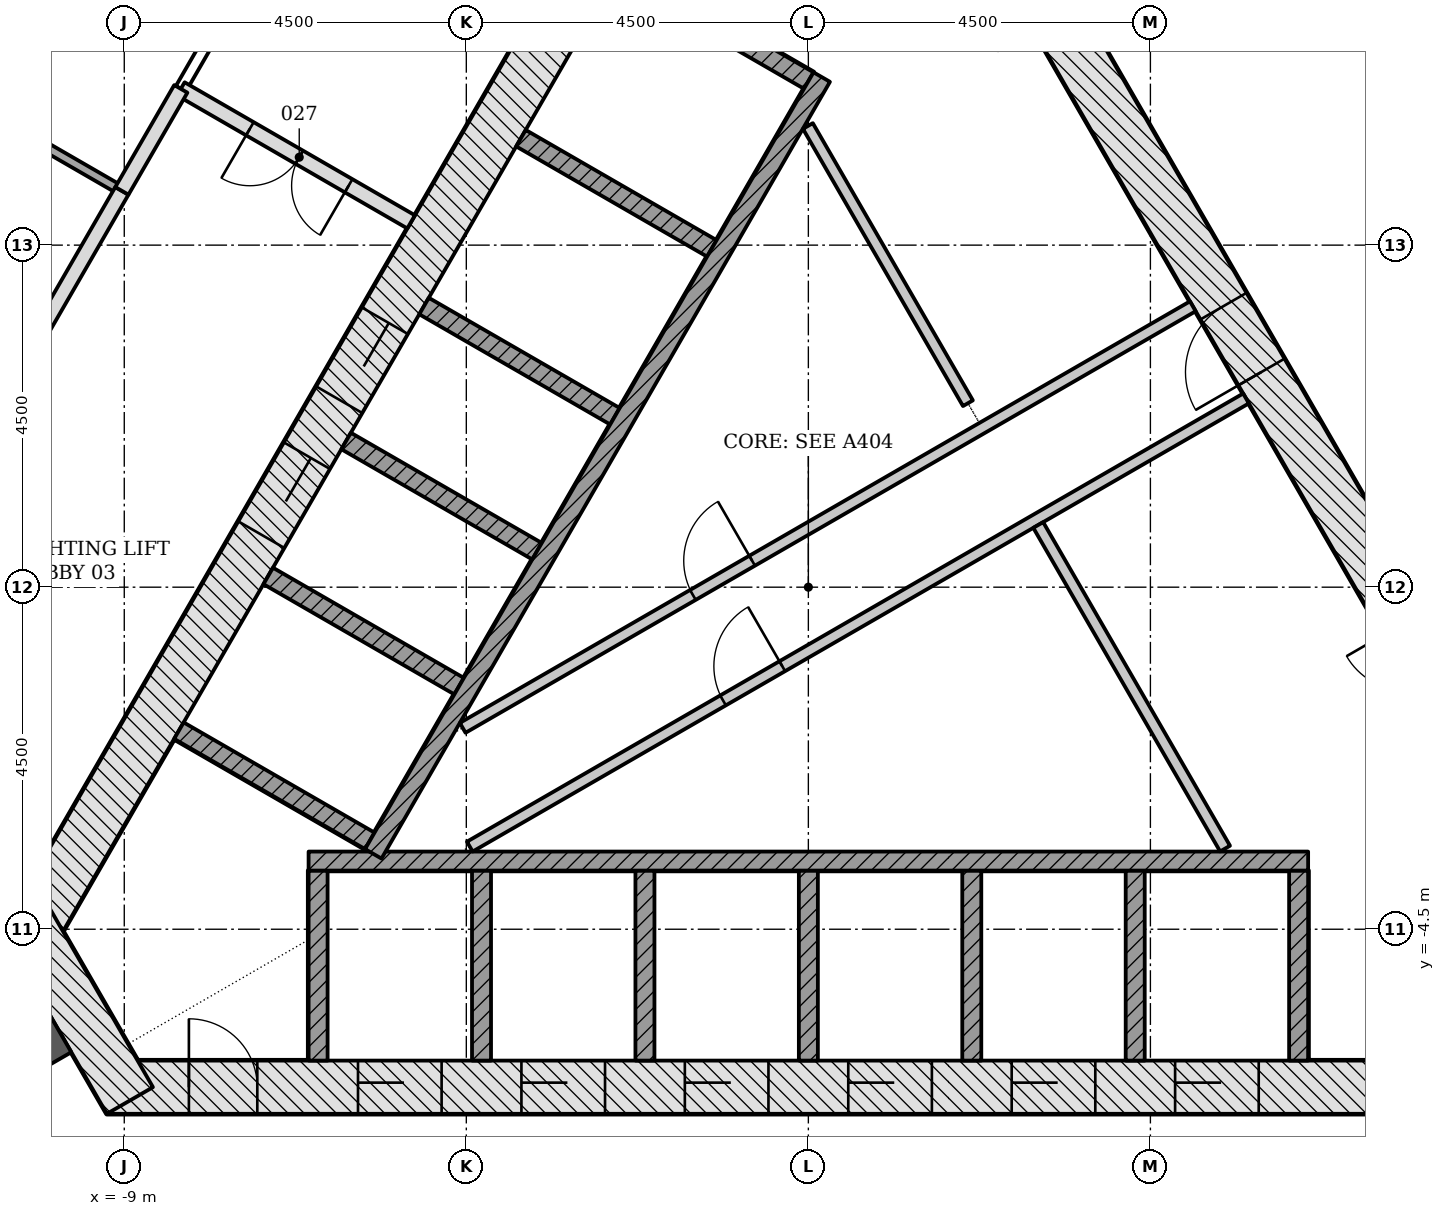
"""IFC4 building model, lengths in metres.
Left out: names, types, materials, properties, quantities, classifications, styles, units other than length and angle.
Written with IfcOpenShell. Run it as: python <this file> out.ifc"""

import sys

from ifc_helpers import new_model, si_unit, direction, frame, frame_2d, origin, place, context, subcontext, project, spatial, rectangle, extrude, element, fill, save


model = new_model("IFC4")
c1 = context("Model", 3, precision=1e-05, world=origin(), true_north=direction((0.0, 1.0)))
c2 = subcontext(c1, "Body", "Model", "MODEL_VIEW")
j1 = project(units=[si_unit("LENGTHUNIT", "METRE"), si_unit("PLANEANGLEUNIT", "RADIAN")], contexts=[c1])
p1 = place(None, origin())
s1 = spatial("IfcSite", under=j1, at=p1, CompositionType="ELEMENT")
p2 = place(p1, origin())
s2 = spatial("IfcBuilding", under=s1, at=p2, CompositionType="ELEMENT")
p3 = place(p2, frame((0.0, 0.0, 15.0)))
s3 = spatial("IfcBuildingStorey", under=s2, at=p3, CompositionType="ELEMENT", Elevation=15.0)
p4 = place(p3, frame((-9.229, -6.578, -0.25), z_axis=(0.0, 0.0, 1.0), x_axis=(1.0, 0.0, 0.0)))
e1 = element("IfcWall", 1, at=p4, inside=s3, PredefinedType="SHEAR", context=c2, shape_type="SweptSolid", body=[
    extrude(rectangle(XDim=18.458, YDim=0.7, at=frame_2d((9.229, 0.0))), origin(), (0.0, 0.0, 1.0), 4.5),
])
p5 = place(p4, frame((3.304, 0.0, 0.25)))
e2 = element("IfcOpeningElement", 2, at=p5, cuts=e1, PredefinedType="OPENING", context=c2, shape_type="SweptSolid", body=[
    extrude(rectangle(XDim=1.1, YDim=2.1, at=frame_2d((0.55, 1.05))), frame((0.0, 0.36, 0.0), z_axis=(0.0, -1.0, 0.0), x_axis=(1.0, 0.0, 0.0)), (0.0, 0.0, 1.0), 0.72),
])
p6 = place(p4, frame((5.454, 0.0, 0.25)))
e3 = element("IfcOpeningElement", 3, at=p6, cuts=e1, PredefinedType="OPENING", context=c2, shape_type="SweptSolid", body=[
    extrude(rectangle(XDim=1.1, YDim=2.1, at=frame_2d((0.55, 1.05))), frame((0.0, 0.36, 0.0), z_axis=(0.0, -1.0, 0.0), x_axis=(1.0, 0.0, 0.0)), (0.0, 0.0, 1.0), 0.72),
])
p7 = place(p4, frame((7.604, 0.0, 0.25)))
e4 = element("IfcOpeningElement", 4, at=p7, cuts=e1, PredefinedType="OPENING", context=c2, shape_type="SweptSolid", body=[
    extrude(rectangle(XDim=1.1, YDim=2.1, at=frame_2d((0.55, 1.05))), frame((0.0, 0.36, 0.0), z_axis=(0.0, -1.0, 0.0), x_axis=(1.0, 0.0, 0.0)), (0.0, 0.0, 1.0), 0.72),
])
p8 = place(p4, frame((9.754, 0.0, 0.25)))
e5 = element("IfcOpeningElement", 5, at=p8, cuts=e1, PredefinedType="OPENING", context=c2, shape_type="SweptSolid", body=[
    extrude(rectangle(XDim=1.1, YDim=2.1, at=frame_2d((0.55, 1.05))), frame((0.0, 0.36, 0.0), z_axis=(0.0, -1.0, 0.0), x_axis=(1.0, 0.0, 0.0)), (0.0, 0.0, 1.0), 0.72),
])
p9 = place(p4, frame((11.904, 0.0, 0.25)))
e6 = element("IfcOpeningElement", 6, at=p9, cuts=e1, PredefinedType="OPENING", context=c2, shape_type="SweptSolid", body=[
    extrude(rectangle(XDim=1.1, YDim=2.1, at=frame_2d((0.55, 1.05))), frame((0.0, 0.36, 0.0), z_axis=(0.0, -1.0, 0.0), x_axis=(1.0, 0.0, 0.0)), (0.0, 0.0, 1.0), 0.72),
])
p10 = place(p4, frame((14.054, 0.0, 0.25)))
e7 = element("IfcOpeningElement", 7, at=p10, cuts=e1, PredefinedType="OPENING", context=c2, shape_type="SweptSolid", body=[
    extrude(rectangle(XDim=1.1, YDim=2.1, at=frame_2d((0.55, 1.05))), frame((0.0, 0.36, 0.0), z_axis=(0.0, -1.0, 0.0), x_axis=(1.0, 0.0, 0.0)), (0.0, 0.0, 1.0), 0.72),
])
p11 = place(p4, frame((1.079, 0.0, 0.25)))
e8 = element("IfcOpeningElement", 8, at=p11, cuts=e1, PredefinedType="OPENING", context=c2, shape_type="SweptSolid", body=[
    extrude(rectangle(XDim=0.9, YDim=2.1, at=frame_2d((0.45, 1.05))), frame((0.0, 0.36, 0.0), z_axis=(0.0, -1.0, 0.0), x_axis=(1.0, 0.0, 0.0)), (0.0, 0.0, 1.0), 0.72),
])
p12 = place(p3, frame((10.311, -4.703, -0.25), z_axis=(0.0, 0.0, 1.0), x_axis=(-0.500001446645, 0.866024568562, 0.0)))
e9 = element("IfcWall", 9, at=p12, inside=s3, PredefinedType="SHEAR", context=c2, shape_type="SweptSolid", body=[
    extrude(rectangle(XDim=18.458, YDim=0.7, at=frame_2d((9.229, 0.0))), origin(), (0.0, 0.0, 1.0), 4.5),
])
p13 = place(p12, frame((8.7, 0.0, 0.25)))
e10 = element("IfcOpeningElement", 10, at=p13, cuts=e9, PredefinedType="OPENING", context=c2, shape_type="SweptSolid", body=[
    extrude(rectangle(XDim=1.0, YDim=2.1, at=frame_2d((0.5, 1.05))), frame((0.0, 0.36, 0.0), z_axis=(0.0, -1.0, 0.0), x_axis=(1.0, 0.0, 0.0)), (0.0, 0.0, 1.0), 0.72),
])
p14 = place(p12, frame((4.002, 0.0, 0.25)))
e11 = element("IfcOpeningElement", 11, at=p14, cuts=e9, PredefinedType="OPENING", context=c2, shape_type="SweptSolid", body=[
    extrude(rectangle(XDim=0.9, YDim=2.1, at=frame_2d((0.45, 1.05))), frame((0.0, 0.36, 0.0), z_axis=(0.0, -1.0, 0.0), x_axis=(1.0, 0.0, 0.0)), (0.0, 0.0, 1.0), 0.72),
])
p15 = place(p12, frame((14.093, 0.0, 0.25)))
e12 = element("IfcOpeningElement", 12, at=p15, cuts=e9, PredefinedType="OPENING", context=c2, shape_type="SweptSolid", body=[
    extrude(rectangle(XDim=0.9, YDim=2.1, at=frame_2d((0.45, 1.05))), frame((0.0, 0.36, 0.0), z_axis=(0.0, -1.0, 0.0), x_axis=(1.0, 0.0, 0.0)), (0.0, 0.0, 1.0), 0.72),
])
p16 = place(p3, frame((-1.083, 11.281, -0.25), z_axis=(0.0, 0.0, 1.0), x_axis=(-0.500001446645, -0.866024568562, 0.0)))
e13 = element("IfcWall", 13, at=p16, inside=s3, PredefinedType="SHEAR", context=c2, shape_type="SweptSolid", body=[
    extrude(rectangle(XDim=18.458, YDim=0.7, at=frame_2d((9.229, 0.0))), origin(), (0.0, 0.0, 1.0), 4.5),
])
p17 = place(p16, frame((8.979, 0.0, 0.25)))
e14 = element("IfcOpeningElement", 14, at=p17, cuts=e13, PredefinedType="OPENING", context=c2, shape_type="SweptSolid", body=[
    extrude(rectangle(XDim=1.2, YDim=2.1, at=frame_2d((0.6, 1.05))), frame((0.0, 0.36, 0.0), z_axis=(0.0, -1.0, 0.0), x_axis=(1.0, 0.0, 0.0)), (0.0, 0.0, 1.0), 0.72),
])
p18 = place(p16, frame((11.029, 0.0, 0.25)))
e15 = element("IfcOpeningElement", 15, at=p18, cuts=e13, PredefinedType="OPENING", context=c2, shape_type="SweptSolid", body=[
    extrude(rectangle(XDim=1.2, YDim=2.1, at=frame_2d((0.6, 1.05))), frame((0.0, 0.36, 0.0), z_axis=(0.0, -1.0, 0.0), x_axis=(1.0, 0.0, 0.0)), (0.0, 0.0, 1.0), 0.72),
])
p19 = place(p3, frame((-10.311, -4.353, -0.25), z_axis=(0.0, 0.0, 1.0), x_axis=(0.500042739161, -0.866000726912, 0.0)))
e16 = element("IfcWall", 16, at=p19, inside=s3, PredefinedType="SHEAR", context=c2, shape_type="SweptSolid", body=[
    extrude(rectangle(XDim=2.771, YDim=0.7, at=frame_2d((1.386, 0.0))), origin(), (0.0, 0.0, 1.0), 4.5),
])
p20 = place(p3, frame((-9.922, -5.728, -0.25), z_axis=(0.0, 0.0, 1.0), x_axis=(-0.866028046028, -0.499995423472, 0.0)))
e17 = element("IfcWall", 17, at=p20, inside=s3, PredefinedType="SHEAR", context=c2, shape_type="SweptSolid", body=[
    extrude(rectangle(XDim=14.633, YDim=0.9, at=frame_2d((7.316, 0.0))), origin(), (0.0, 0.0, 1.0), 4.5),
])
p21 = place(p20, frame((7.35, 0.0, 0.25)))
e18 = element("IfcOpeningElement", 18, at=p21, cuts=e17, PredefinedType="OPENING", context=c2, shape_type="SweptSolid", body=[
    extrude(rectangle(XDim=1.5, YDim=2.1, at=frame_2d((0.75, 1.05))), frame((0.0, 0.46, 0.0), z_axis=(0.0, -1.0, 0.0), x_axis=(1.0, 0.0, 0.0)), (0.0, 0.0, 1.0), 0.92),
])
for number, where, z_axis, x_axis in (
    (19, (-6.45, -6.228, -0.25), (0.0, 0.0, 1.0), (0.0, 1.0, 0.0)),
    (20, (-4.3, -6.228, -0.25), (0.0, 0.0, 1.0), (0.0, 1.0, 0.0)),
    (21, (-2.15, -6.228, -0.25), (0.0, 0.0, 1.0), (0.0, 1.0, 0.0)),
    (22, (0.0, -6.228, -0.25), (0.0, 0.0, 1.0), (0.0, 1.0, 0.0)),
    (23, (2.15, -6.228, -0.25), (0.0, 0.0, 1.0), (0.0, 1.0, 0.0)),
    (24, (4.3, -6.228, -0.25), (0.0, 0.0, 1.0), (0.0, 1.0, 0.0)),
    (25, (6.45, -6.228, -0.25), (0.0, 0.0, 1.0), (0.0, 1.0, 0.0)),
):
    element("IfcWall", number, at=place(p3, frame(where, z_axis=z_axis, x_axis=x_axis)), inside=s3, PredefinedType="PARTITIONING", context=c2, shape_type="SweptSolid", body=[
        extrude(rectangle(XDim=2.5, YDim=0.25, at=frame_2d((1.25, 0.0))), origin(), (0.0, 0.0, 1.0), 4.5),
    ])
p22 = place(p3, frame((-6.575, -3.603, 0.0), z_axis=(0.0, 0.0, 1.0), x_axis=(1.0, 0.0, 0.0)))
e26 = element("IfcWall", 26, at=p22, inside=s3, PredefinedType="PARTITIONING", context=c2, shape_type="SweptSolid", body=[
    extrude(rectangle(XDim=13.15, YDim=0.25, at=frame_2d((6.575, 0.0))), origin(), (0.0, 0.0, 1.0), 4.25),
])
p23 = place(p3, frame((-2.506, 8.115, -0.25), z_axis=(0.0, 0.0, 1.0), x_axis=(0.865996321171, -0.50005036918, 0.0)))
e27 = element("IfcWall", 27, at=p23, inside=s3, PredefinedType="PARTITIONING", context=c2, shape_type="SweptSolid", body=[
    extrude(rectangle(XDim=2.9, YDim=0.25, at=frame_2d((1.45, 0.0))), origin(), (0.0, 0.0, 1.0), 4.5),
])
for number, where, z_axis, x_axis in (
    (28, (-3.781, 5.907, -0.25), (0.0, 0.0, 1.0), (0.866, -0.5, 0.0)),
    (29, (-5.056, 3.699, -0.25), (0.0, 0.0, 1.0), (0.866, -0.5, 0.0)),
    (30, (-6.081, 1.923, -0.25), (0.0, 0.0, 1.0), (0.866, -0.5, 0.0)),
    (31, (-7.106, 0.148, -0.25), (0.0, 0.0, 1.0), (0.866, -0.5, 0.0)),
    (32, (-8.281, -1.887, -0.25), (0.0, 0.0, 1.0), (0.866, -0.5, 0.0)),
):
    element("IfcWall", number, at=place(p3, frame(where, z_axis=z_axis, x_axis=x_axis)), inside=s3, PredefinedType="PARTITIONING", context=c2, shape_type="SweptSolid", body=[
        extrude(rectangle(XDim=2.9, YDim=0.25, at=frame_2d((1.45, 0.0))), origin(), (0.0, 0.0, 1.0), 4.5),
    ])
p24 = place(p3, frame((0.176, 6.711, 0.0), z_axis=(0.0, 0.0, 1.0), x_axis=(-0.500004227369, -0.866022963098, 0.0)))
e33 = element("IfcWall", 33, at=p24, inside=s3, PredefinedType="PARTITIONING", context=c2, shape_type="SweptSolid", body=[
    extrude(rectangle(XDim=11.8, YDim=0.25, at=frame_2d((5.9, 0.0))), origin(), (0.0, 0.0, 1.0), 4.25),
])
p25 = place(p3, frame((-4.548, -1.851, 0.0), z_axis=(0.0, 0.0, 1.0), x_axis=(0.866023939251, 0.500002536638, 0.0)))
e34 = element("IfcWall", 34, at=p25, inside=s3, PredefinedType="PARTITIONING", context=c2, shape_type="SweptSolid", body=[
    extrude(rectangle(XDim=11.092, YDim=0.15, at=frame_2d((5.546, 0.0))), origin(), (0.0, 0.0, 1.0), 4.25),
])
p26 = place(p25, frame((3.497, 0.0, 0.0)))
e35 = element("IfcOpeningElement", 35, at=p26, cuts=e34, PredefinedType="OPENING", context=c2, shape_type="SweptSolid", body=[
    extrude(rectangle(XDim=0.9, YDim=2.1, at=frame_2d((0.45, 1.05))), frame((0.0, 0.085, 0.0), z_axis=(0.0, -1.0, 0.0), x_axis=(1.0, 0.0, 0.0)), (0.0, 0.0, 1.0), 0.17),
])
p27 = place(p3, frame((2.099, 2.42, 0.0), z_axis=(0.0, 0.0, 1.0), x_axis=(-0.499998449073, 0.866026299211, 0.0)))
e36 = element("IfcWall", 36, at=p27, inside=s3, PredefinedType="PARTITIONING", context=c2, shape_type="SweptSolid", body=[
    extrude(rectangle(XDim=4.211, YDim=0.15, at=frame_2d((2.106, 0.0))), origin(), (0.0, 0.0, 1.0), 4.25),
])
p28 = place(p3, frame((-4.454, -3.413, 0.0), z_axis=(0.0, 0.0, 1.0), x_axis=(0.86603043987, 0.499991277142, 0.0)))
e37 = element("IfcWall", 37, at=p28, inside=s3, PredefinedType="PARTITIONING", context=c2, shape_type="SweptSolid", body=[
    extrude(rectangle(XDim=11.792, YDim=0.15, at=frame_2d((5.896, 0.0))), origin(), (0.0, 0.0, 1.0), 4.25),
])
p29 = place(p28, frame((3.847, 0.0, 0.0)))
e38 = element("IfcOpeningElement", 38, at=p29, cuts=e37, PredefinedType="OPENING", context=c2, shape_type="SweptSolid", body=[
    extrude(rectangle(XDim=0.9, YDim=2.1, at=frame_2d((0.45, 1.05))), frame((0.0, 0.085, 0.0), z_axis=(0.0, -1.0, 0.0), x_axis=(1.0, 0.0, 0.0)), (0.0, 0.0, 1.0), 0.17),
])
p30 = place(p3, frame((5.482, -3.439, 0.0), z_axis=(0.0, 0.0, 1.0), x_axis=(-0.500006183238, 0.866021833861, 0.0)))
e39 = element("IfcWall", 39, at=p30, inside=s3, PredefinedType="PARTITIONING", context=c2, shape_type="SweptSolid", body=[
    extrude(rectangle(XDim=4.916, YDim=0.15, at=frame_2d((2.458, 0.0))), origin(), (0.0, 0.0, 1.0), 4.25),
])
p31 = place(p3, frame((-9.032, 5.213, 0.0), z_axis=(0.0, 0.0, 1.0), x_axis=(-0.499876332206, -0.866096791646, 0.0)))
e40 = element("IfcWall", 40, at=p31, inside=s3, PredefinedType="PARTITIONING", context=c2, shape_type="SweptSolid", body=[
    extrude(rectangle(XDim=4.349, YDim=0.2, at=frame_2d((2.175, 0.0))), origin(), (0.0, 0.0, 1.0), 3.638),
])
p32 = place(p3, frame((-5.226, 4.806, 0.0), z_axis=(0.0, 0.0, 1.0), x_axis=(-0.865949687125, 0.500131122175, 0.0)))
e41 = element("IfcWall", 41, at=p32, inside=s3, PredefinedType="PARTITIONING", context=c2, shape_type="SweptSolid", body=[
    extrude(rectangle(XDim=3.499, YDim=0.2, at=frame_2d((1.75, 0.0))), origin(), (0.0, 0.0, 1.0), 4.25),
])
p33 = place(p32, frame((0.95, 0.0, 0.0)))
e42 = element("IfcOpeningElement", 42, at=p33, cuts=e41, PredefinedType="OPENING", context=c2, shape_type="SweptSolid", body=[
    extrude(rectangle(XDim=1.5, YDim=2.1, at=frame_2d((0.75, 1.05))), frame((0.0, 0.11, 0.0), z_axis=(0.0, -1.0, 0.0), x_axis=(1.0, 0.0, 0.0)), (0.0, 0.0, 1.0), 0.22),
])
p34 = place(p3, frame((-8.256, 6.556, 0.0), z_axis=(0.0, 0.0, 1.0), x_axis=(-0.500104332946, -0.86596515875, 0.0)))
e43 = element("IfcWall", 43, at=p34, inside=s3, PredefinedType="PARTITIONING", context=c2, shape_type="SweptSolid", body=[
    extrude(rectangle(XDim=1.55, YDim=0.2, at=frame_2d((0.775, 0.0))), origin(), (0.0, 0.0, 1.0), 3.638),
])
p35 = place(p3, frame((11.206, 1.446, 0.0), z_axis=(0.0, 0.0, 1.0), x_axis=(-0.500116761363, 0.865957981085, 0.0)))
e44 = element("IfcWall", 44, at=p35, inside=s3, PredefinedType="PARTITIONING", context=c2, shape_type="SweptSolid", body=[
    extrude(rectangle(XDim=8.7, YDim=0.15, at=frame_2d((4.35, 0.0))), origin(), (0.0, 0.0, 1.0), 3.638),
])
p36 = place(p35, frame((3.45, 0.0, 0.0)))
e45 = element("IfcOpeningElement", 45, at=p36, cuts=e44, PredefinedType="OPENING", context=c2, shape_type="SweptSolid", body=[
    extrude(rectangle(XDim=1.8, YDim=2.1, at=frame_2d((0.9, 1.05))), frame((0.0, 0.085, 0.0), z_axis=(0.0, -1.0, 0.0), x_axis=(1.0, 0.0, 0.0)), (0.0, 0.0, 1.0), 0.17),
])
p37 = place(p3, frame((-9.033, 5.214, 0.0), z_axis=(0.0, 0.0, 1.0), x_axis=(-0.866000641544, 0.500042887006, 0.0)))
e46 = element("IfcWall", 46, at=p37, inside=s3, PredefinedType="PARTITIONING", context=c2, shape_type="SweptSolid", body=[
    extrude(rectangle(XDim=9.827, YDim=0.12, at=frame_2d((4.914, 0.0))), origin(), (0.0, 0.0, 1.0), 3.638),
])
p38 = place(p37, frame((4.45, 0.0, 0.0)))
e47 = element("IfcOpeningElement", 47, at=p38, cuts=e46, PredefinedType="OPENING", context=c2, shape_type="SweptSolid", body=[
    extrude(rectangle(XDim=1.0, YDim=2.1, at=frame_2d((0.5, 1.05))), frame((0.0, 0.07, 0.0), z_axis=(0.0, -1.0, 0.0), x_axis=(1.0, 0.0, 0.0)), (0.0, 0.0, 1.0), 0.14),
])
p39 = place(p3, frame((-3.406, 14.956, 0.0), z_axis=(0.0, 0.0, 1.0), x_axis=(-0.500020940175, -0.866013313631, 0.0)))
e48 = element("IfcWall", 48, at=p39, inside=s3, PredefinedType="PARTITIONING", context=c2, shape_type="SweptSolid", body=[
    extrude(rectangle(XDim=9.7, YDim=0.15, at=frame_2d((4.85, 0.0))), origin(), (0.0, 0.0, 1.0), 3.638),
])
p40 = place(p39, frame((3.95, 0.0, 0.0)))
e49 = element("IfcOpeningElement", 49, at=p40, cuts=e48, PredefinedType="OPENING", context=c2, shape_type="SweptSolid", body=[
    extrude(rectangle(XDim=1.8, YDim=2.1, at=frame_2d((0.9, 1.05))), frame((0.0, 0.085, 0.0), z_axis=(0.0, -1.0, 0.0), x_axis=(1.0, 0.0, 0.0)), (0.0, 0.0, 1.0), 0.17),
])
p41 = place(p5, origin())
e50 = element("IfcDoor", 50, at=p41, inside=s3, OperationType="DOUBLE_DOOR_SLIDING", PredefinedType="DOOR", context=c2, shape_type="SweptSolid", body=[
    extrude(rectangle(XDim=1.1, YDim=2.1, at=frame_2d((0.55, 1.05))), frame((0.0, 0.025, 0.0), z_axis=(0.0, -1.0, 0.0), x_axis=(1.0, 0.0, 0.0)), (0.0, 0.0, 1.0), 0.05),
])
fill(e2, e50)
p42 = place(p6, origin())
e51 = element("IfcDoor", 51, at=p42, inside=s3, OperationType="DOUBLE_DOOR_SLIDING", PredefinedType="DOOR", context=c2, shape_type="SweptSolid", body=[
    extrude(rectangle(XDim=1.1, YDim=2.1, at=frame_2d((0.55, 1.05))), frame((0.0, 0.025, 0.0), z_axis=(0.0, -1.0, 0.0), x_axis=(1.0, 0.0, 0.0)), (0.0, 0.0, 1.0), 0.05),
])
fill(e3, e51)
p43 = place(p7, origin())
e52 = element("IfcDoor", 52, at=p43, inside=s3, OperationType="DOUBLE_DOOR_SLIDING", PredefinedType="DOOR", context=c2, shape_type="SweptSolid", body=[
    extrude(rectangle(XDim=1.1, YDim=2.1, at=frame_2d((0.55, 1.05))), frame((0.0, 0.025, 0.0), z_axis=(0.0, -1.0, 0.0), x_axis=(1.0, 0.0, 0.0)), (0.0, 0.0, 1.0), 0.05),
])
fill(e4, e52)
p44 = place(p8, origin())
e53 = element("IfcDoor", 53, at=p44, inside=s3, OperationType="DOUBLE_DOOR_SLIDING", PredefinedType="DOOR", context=c2, shape_type="SweptSolid", body=[
    extrude(rectangle(XDim=1.1, YDim=2.1, at=frame_2d((0.55, 1.05))), frame((0.0, 0.025, 0.0), z_axis=(0.0, -1.0, 0.0), x_axis=(1.0, 0.0, 0.0)), (0.0, 0.0, 1.0), 0.05),
])
fill(e5, e53)
p45 = place(p9, origin())
e54 = element("IfcDoor", 54, at=p45, inside=s3, OperationType="DOUBLE_DOOR_SLIDING", PredefinedType="DOOR", context=c2, shape_type="SweptSolid", body=[
    extrude(rectangle(XDim=1.1, YDim=2.1, at=frame_2d((0.55, 1.05))), frame((0.0, 0.025, 0.0), z_axis=(0.0, -1.0, 0.0), x_axis=(1.0, 0.0, 0.0)), (0.0, 0.0, 1.0), 0.05),
])
fill(e6, e54)
p46 = place(p10, origin())
e55 = element("IfcDoor", 55, at=p46, inside=s3, OperationType="DOUBLE_DOOR_SLIDING", PredefinedType="DOOR", context=c2, shape_type="SweptSolid", body=[
    extrude(rectangle(XDim=1.1, YDim=2.1, at=frame_2d((0.55, 1.05))), frame((0.0, 0.025, 0.0), z_axis=(0.0, -1.0, 0.0), x_axis=(1.0, 0.0, 0.0)), (0.0, 0.0, 1.0), 0.05),
])
fill(e7, e55)
p47 = place(p17, origin())
e56 = element("IfcDoor", 56, at=p47, inside=s3, OperationType="DOUBLE_DOOR_SLIDING", PredefinedType="DOOR", context=c2, shape_type="SweptSolid", body=[
    extrude(rectangle(XDim=1.2, YDim=2.1, at=frame_2d((0.6, 1.05))), frame((0.0, 0.025, 0.0), z_axis=(0.0, -1.0, 0.0), x_axis=(1.0, 0.0, 0.0)), (0.0, 0.0, 1.0), 0.05),
])
fill(e14, e56)
p48 = place(p18, origin())
e57 = element("IfcDoor", 57, at=p48, inside=s3, OperationType="DOUBLE_DOOR_SLIDING", PredefinedType="DOOR", context=c2, shape_type="SweptSolid", body=[
    extrude(rectangle(XDim=1.2, YDim=2.1, at=frame_2d((0.6, 1.05))), frame((0.0, 0.025, 0.0), z_axis=(0.0, -1.0, 0.0), x_axis=(1.0, 0.0, 0.0)), (0.0, 0.0, 1.0), 0.05),
])
fill(e15, e57)
p49 = place(p13, origin())
e58 = element("IfcDoor", 58, at=p49, inside=s3, OperationType="SINGLE_SWING_LEFT", PredefinedType="DOOR", context=c2, shape_type="SweptSolid", body=[
    extrude(rectangle(XDim=1.0, YDim=2.1, at=frame_2d((0.5, 1.05))), frame((0.0, 0.075, 0.0), z_axis=(0.0, -1.0, 0.0), x_axis=(1.0, 0.0, 0.0)), (0.0, 0.0, 1.0), 0.15),
])
fill(e10, e58)
p50 = place(p29, origin())
e59 = element("IfcDoor", 59, at=p50, inside=s3, OperationType="SINGLE_SWING_RIGHT", PredefinedType="DOOR", context=c2, shape_type="SweptSolid", body=[
    extrude(rectangle(XDim=0.9, YDim=2.1, at=frame_2d((0.45, 1.05))), frame((0.0, 0.025, 0.0), z_axis=(0.0, -1.0, 0.0), x_axis=(1.0, 0.0, 0.0)), (0.0, 0.0, 1.0), 0.05),
])
fill(e38, e59)
p51 = place(p11, origin())
e60 = element("IfcDoor", 60, at=p51, inside=s3, OperationType="SINGLE_SWING_LEFT", PredefinedType="DOOR", context=c2, shape_type="SweptSolid", body=[
    extrude(rectangle(XDim=0.9, YDim=2.1, at=frame_2d((0.45, 1.05))), frame((0.0, 0.075, 0.0), z_axis=(0.0, -1.0, 0.0), x_axis=(1.0, 0.0, 0.0)), (0.0, 0.0, 1.0), 0.15),
])
fill(e8, e60)
p52 = place(p26, origin())
e61 = element("IfcDoor", 61, at=p52, inside=s3, OperationType="SINGLE_SWING_RIGHT", PredefinedType="DOOR", context=c2, shape_type="SweptSolid", body=[
    extrude(rectangle(XDim=0.9, YDim=2.1, at=frame_2d((0.45, 1.05))), frame((0.0, 0.025, 0.0), z_axis=(0.0, -1.0, 0.0), x_axis=(1.0, 0.0, 0.0)), (0.0, 0.0, 1.0), 0.05),
])
fill(e35, e61)
p53 = place(p33, origin())
e62 = element("IfcDoor", 62, at=p53, inside=s3, OperationType="DOUBLE_DOOR_SINGLE_SWING", PredefinedType="DOOR", context=c2, shape_type="SweptSolid", body=[
    extrude(rectangle(XDim=1.5, YDim=2.1, at=frame_2d((0.75, 1.05))), frame((0.0, 0.025, 0.0), z_axis=(0.0, -1.0, 0.0), x_axis=(1.0, 0.0, 0.0)), (0.0, 0.0, 1.0), 0.05),
])
fill(e42, e62)
save(model, sys.argv[1])
